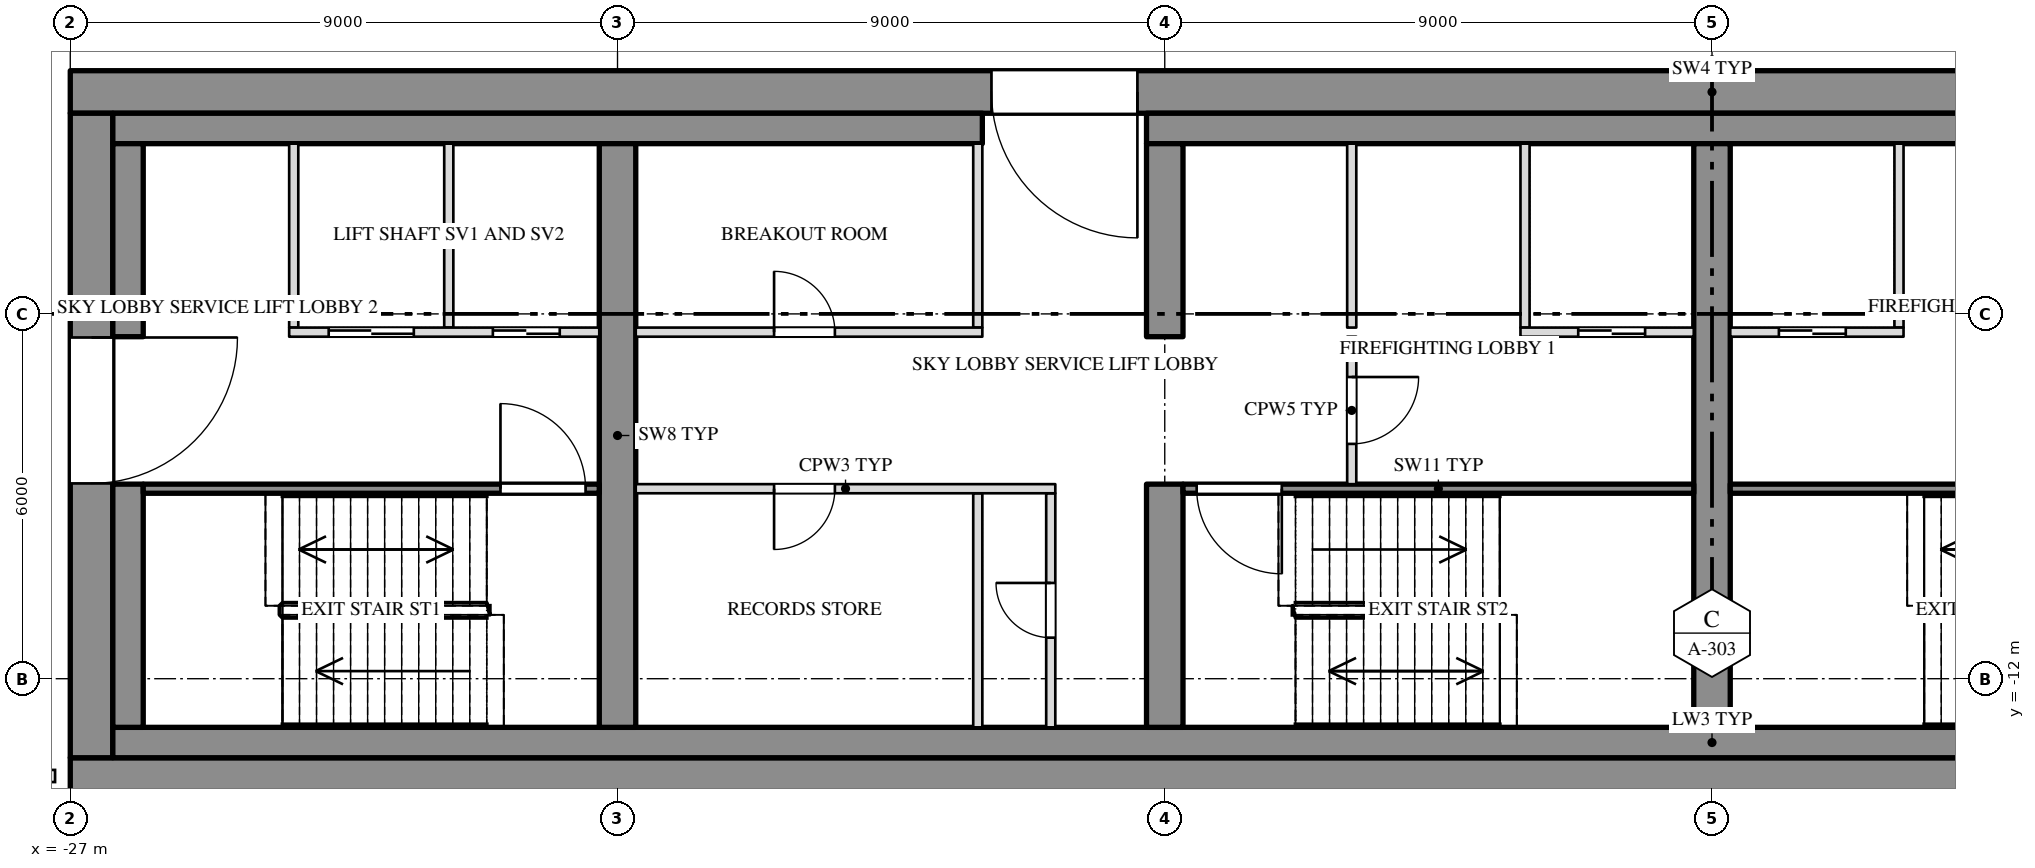
"""IFC4 building model, lengths in metres.
Left out: names, types, materials, properties, quantities, classifications, styles, units other than length and angle.
Written with IfcOpenShell. Run it as: python <this file> out.ifc"""

import sys

from ifc_helpers import new_model, si_unit, direction, frame, frame_2d, origin, place, context, subcontext, project, spatial, rectangle, extrude, element, fill, save


model = new_model("IFC4")
c1 = context("Model", 3, precision=1e-05, world=origin(), true_north=direction((0.0, 1.0)))
c2 = subcontext(c1, "Body", "Model", "MODEL_VIEW")
j1 = project(units=[si_unit("LENGTHUNIT", "METRE"), si_unit("PLANEANGLEUNIT", "RADIAN")], contexts=[c1])
p1 = place(None, origin())
s1 = spatial("IfcSite", under=j1, at=p1, CompositionType="ELEMENT")
p2 = place(p1, origin())
s2 = spatial("IfcBuilding", under=s1, at=p2, CompositionType="ELEMENT")
p3 = place(p2, frame((0.0, 0.0, 264.5)))
s3 = spatial("IfcBuildingStorey", under=s2, at=p3, CompositionType="ELEMENT", Elevation=264.5)
p4 = place(p3, frame((-27.0, -2.35, 0.0), z_axis=(0.0, 0.0, 1.0), x_axis=(1.0, 0.0, 0.0)))
e1 = element("IfcWall", 1, at=p4, inside=s3, PredefinedType="SHEAR", context=c2, shape_type="SweptSolid", body=[
    extrude(rectangle(XDim=54.0, YDim=0.7, at=frame_2d((27.0, 0.0))), origin(), (0.0, 0.0, 1.0), 3.65),
])
p5 = place(p4, frame((15.15, 0.0, 0.0)))
e2 = element("IfcOpeningElement", 2, at=p5, cuts=e1, PredefinedType="OPENING", context=c2, shape_type="SweptSolid", body=[
    extrude(rectangle(XDim=2.4, YDim=2.1, at=frame_2d((1.2, 1.05))), frame((0.0, 0.362, 0.0), z_axis=(0.0, -1.0, 0.0), x_axis=(1.0, 0.0, 0.0)), (0.0, 0.0, 1.0), 0.724),
])
p6 = place(p4, frame((36.45, 0.0, 0.0)))
e3 = element("IfcOpeningElement", 3, at=p6, cuts=e1, PredefinedType="OPENING", context=c2, shape_type="SweptSolid", body=[
    extrude(rectangle(XDim=2.4, YDim=2.1, at=frame_2d((1.2, 1.05))), frame((0.0, 0.362, 0.0), z_axis=(0.0, -1.0, 0.0), x_axis=(1.0, 0.0, 0.0)), (0.0, 0.0, 1.0), 0.724),
])
p7 = place(p3, frame((-27.0, -13.65, 0.0), z_axis=(0.0, 0.0, 1.0), x_axis=(1.0, 0.0, 0.0)))
e4 = element("IfcWall", 4, at=p7, inside=s3, PredefinedType="SHEAR", context=c2, shape_type="SweptSolid", body=[
    extrude(rectangle(XDim=54.0, YDim=0.7, at=frame_2d((27.0, 0.0))), origin(), (0.0, 0.0, 1.0), 3.65),
])
p8 = place(p3, frame((-26.65, -13.3, 0.0), z_axis=(0.0, 0.0, 1.0), x_axis=(0.0, 1.0, 0.0)))
e5 = element("IfcWall", 5, at=p8, inside=s3, PredefinedType="SHEAR", context=c2, shape_type="SweptSolid", body=[
    extrude(rectangle(XDim=10.6, YDim=0.7, at=frame_2d((5.3, 0.0))), origin(), (0.0, 0.0, 1.0), 3.65),
])
p9 = place(p8, frame((4.512, 0.0, 0.0)))
e6 = element("IfcOpeningElement", 6, at=p9, cuts=e5, PredefinedType="OPENING", context=c2, shape_type="SweptSolid", body=[
    extrude(rectangle(XDim=2.4, YDim=2.1, at=frame_2d((1.2, 1.05))), frame((0.0, 0.362, 0.0), z_axis=(0.0, -1.0, 0.0), x_axis=(1.0, 0.0, 0.0)), (0.0, 0.0, 1.0), 0.724),
])
p10 = place(p3, frame((-26.3, -2.95, 0.0), z_axis=(0.0, 0.0, 1.0), x_axis=(1.0, 0.0, 0.0)))
e7 = element("IfcWall", 7, at=p10, inside=s3, PredefinedType="SHEAR", context=c2, shape_type="SweptSolid", body=[
    extrude(rectangle(XDim=14.3, YDim=0.5, at=frame_2d((7.15, 0.0))), origin(), (0.0, 0.0, 1.0), 3.65),
])
p11 = place(p3, frame((-9.3, -2.95, 0.0), z_axis=(0.0, 0.0, 1.0), x_axis=(1.0, 0.0, 0.0)))
e8 = element("IfcWall", 8, at=p11, inside=s3, PredefinedType="SHEAR", context=c2, shape_type="SweptSolid", body=[
    extrude(rectangle(XDim=18.6, YDim=0.5, at=frame_2d((9.3, 0.0))), origin(), (0.0, 0.0, 1.0), 3.65),
])
p12 = place(p3, frame((-26.3, -13.05, 0.0), z_axis=(0.0, 0.0, 1.0), x_axis=(1.0, 0.0, 0.0)))
e9 = element("IfcWall", 9, at=p12, inside=s3, PredefinedType="SHEAR", context=c2, shape_type="SweptSolid", body=[
    extrude(rectangle(XDim=52.6, YDim=0.5, at=frame_2d((26.3, 0.0))), origin(), (0.0, 0.0, 1.0), 3.65),
])
p13 = place(p3, frame((-26.05, -12.8, 0.0), z_axis=(0.0, 0.0, 1.0), x_axis=(0.0, 1.0, 0.0)))
e10 = element("IfcWall", 10, at=p13, inside=s3, PredefinedType="SHEAR", context=c2, shape_type="SweptSolid", body=[
    extrude(rectangle(XDim=4.0, YDim=0.5, at=frame_2d((2.0, 0.0))), origin(), (0.0, 0.0, 1.0), 3.65),
])
p14 = place(p3, frame((-26.05, -6.375, 0.0), z_axis=(0.0, 0.0, 1.0), x_axis=(0.0, 1.0, 0.0)))
e11 = element("IfcWall", 11, at=p14, inside=s3, PredefinedType="SHEAR", context=c2, shape_type="SweptSolid", body=[
    extrude(rectangle(XDim=3.175, YDim=0.5, at=frame_2d((1.587, 0.0))), origin(), (0.0, 0.0, 1.0), 3.65),
])
p15 = place(p3, frame((-18.0, -12.8, 0.0), z_axis=(0.0, 0.0, 1.0), x_axis=(0.0, 1.0, 0.0)))
e12 = element("IfcWall", 12, at=p15, inside=s3, PredefinedType="SHEAR", context=c2, shape_type="SweptSolid", body=[
    extrude(rectangle(XDim=9.6, YDim=0.6, at=frame_2d((4.8, 0.0))), origin(), (0.0, 0.0, 1.0), 3.65),
])
p16 = place(p3, frame((-9.0, -12.8, 0.0), z_axis=(0.0, 0.0, 1.0), x_axis=(0.0, 1.0, 0.0)))
e13 = element("IfcWall", 13, at=p16, inside=s3, PredefinedType="SHEAR", context=c2, shape_type="SweptSolid", body=[
    extrude(rectangle(XDim=4.0, YDim=0.6, at=frame_2d((2.0, 0.0))), origin(), (0.0, 0.0, 1.0), 3.65),
])
p17 = place(p3, frame((-9.0, -6.375, 0.0), z_axis=(0.0, 0.0, 1.0), x_axis=(0.0, 1.0, 0.0)))
e14 = element("IfcWall", 14, at=p17, inside=s3, PredefinedType="SHEAR", context=c2, shape_type="SweptSolid", body=[
    extrude(rectangle(XDim=3.175, YDim=0.6, at=frame_2d((1.587, 0.0))), origin(), (0.0, 0.0, 1.0), 3.65),
])
p18 = place(p3, frame((0.0, -12.8, 0.0), z_axis=(0.0, 0.0, 1.0), x_axis=(0.0, 1.0, 0.0)))
e15 = element("IfcWall", 15, at=p18, inside=s3, PredefinedType="SHEAR", context=c2, shape_type="SweptSolid", body=[
    extrude(rectangle(XDim=9.6, YDim=0.6, at=frame_2d((4.8, 0.0))), origin(), (0.0, 0.0, 1.0), 3.65),
])
for number, where, z_axis, x_axis in (
    (16, (-20.775, -6.225, 0.0), (0.0, 0.0, 1.0), (0.0, 1.0, 0.0)),
    (17, (-23.325, -6.225, 0.0), (0.0, 0.0, 1.0), (0.0, 1.0, 0.0)),
    (18, (-12.075, -6.225, 0.0), (0.0, 0.0, 1.0), (0.0, 1.0, 0.0)),
    (19, (-3.075, -6.225, 0.0), (0.0, 0.0, 1.0), (0.0, 1.0, 0.0)),
    (20, (-5.925, -6.225, 0.0), (0.0, 0.0, 1.0), (0.0, 1.0, 0.0)),
    (21, (3.075, -6.225, 0.0), (0.0, 0.0, 1.0), (0.0, 1.0, 0.0)),
):
    element("IfcWall", number, at=place(p3, frame(where, z_axis=z_axis, x_axis=x_axis)), inside=s3, PredefinedType="PARTITIONING", context=c2, shape_type="SweptSolid", body=[
        extrude(rectangle(XDim=3.025, YDim=0.15, at=frame_2d((1.513, 0.0))), origin(), (0.0, 0.0, 1.0), 3.65),
    ])
p19 = place(p3, frame((-10.875, -12.8, 0.0), z_axis=(0.0, 0.0, 1.0), x_axis=(0.0, 1.0, 0.0)))
e22 = element("IfcWall", 22, at=p19, inside=s3, PredefinedType="PARTITIONING", context=c2, shape_type="SweptSolid", body=[
    extrude(rectangle(XDim=3.85, YDim=0.15, at=frame_2d((1.925, 0.0))), origin(), (0.0, 0.0, 1.0), 3.65),
])
p20 = place(p19, frame((1.475, 0.0, 0.0)))
e23 = element("IfcOpeningElement", 23, at=p20, cuts=e22, PredefinedType="OPENING", context=c2, shape_type="SweptSolid", body=[
    extrude(rectangle(XDim=0.9, YDim=2.1, at=frame_2d((0.45, 1.05))), frame((0.0, 0.087, 0.0), z_axis=(0.0, -1.0, 0.0), x_axis=(1.0, 0.0, 0.0)), (0.0, 0.0, 1.0), 0.174),
])
p21 = place(p3, frame((-12.075, -12.8, 0.0), z_axis=(0.0, 0.0, 1.0), x_axis=(0.0, 1.0, 0.0)))
e24 = element("IfcWall", 24, at=p21, inside=s3, PredefinedType="PARTITIONING", context=c2, shape_type="SweptSolid", body=[
    extrude(rectangle(XDim=3.85, YDim=0.15, at=frame_2d((1.925, 0.0))), origin(), (0.0, 0.0, 1.0), 3.65),
])
p22 = place(p3, frame((-5.925, -8.8, 0.0), z_axis=(0.0, 0.0, 1.0), x_axis=(0.0, 1.0, 0.0)))
e25 = element("IfcWall", 25, at=p22, inside=s3, PredefinedType="PARTITIONING", context=c2, shape_type="SweptSolid", body=[
    extrude(rectangle(XDim=2.425, YDim=0.15, at=frame_2d((1.212, 0.0))), origin(), (0.0, 0.0, 1.0), 3.65),
])
p23 = place(p22, frame((0.662, 0.0, 0.0)))
e26 = element("IfcOpeningElement", 26, at=p23, cuts=e25, PredefinedType="OPENING", context=c2, shape_type="SweptSolid", body=[
    extrude(rectangle(XDim=1.1, YDim=2.1, at=frame_2d((0.55, 1.05))), frame((0.0, 0.087, 0.0), z_axis=(0.0, -1.0, 0.0), x_axis=(1.0, 0.0, 0.0)), (0.0, 0.0, 1.0), 0.174),
])
p24 = place(p3, frame((-23.4, -6.3, 0.0), z_axis=(0.0, 0.0, 1.0), x_axis=(1.0, 0.0, 0.0)))
e27 = element("IfcWall", 27, at=p24, inside=s3, PredefinedType="PARTITIONING", context=c2, shape_type="SweptSolid", body=[
    extrude(rectangle(XDim=5.1, YDim=0.15, at=frame_2d((2.55, 0.0))), origin(), (0.0, 0.0, 1.0), 3.65),
])
p25 = place(p24, frame((0.65, 0.0, 0.0)))
e28 = element("IfcOpeningElement", 28, at=p25, cuts=e27, PredefinedType="OPENING", context=c2, shape_type="SweptSolid", body=[
    extrude(rectangle(XDim=1.4, YDim=2.1, at=frame_2d((0.7, 1.05))), frame((0.0, 0.087, 0.0), z_axis=(0.0, -1.0, 0.0), x_axis=(1.0, 0.0, 0.0)), (0.0, 0.0, 1.0), 0.174),
])
p26 = place(p24, frame((3.35, 0.0, 0.0)))
e29 = element("IfcOpeningElement", 29, at=p26, cuts=e27, PredefinedType="OPENING", context=c2, shape_type="SweptSolid", body=[
    extrude(rectangle(XDim=1.1, YDim=2.1, at=frame_2d((0.55, 1.05))), frame((0.0, 0.087, 0.0), z_axis=(0.0, -1.0, 0.0), x_axis=(1.0, 0.0, 0.0)), (0.0, 0.0, 1.0), 0.174),
])
p27 = place(p3, frame((-17.7, -6.3, 0.0), z_axis=(0.0, 0.0, 1.0), x_axis=(1.0, 0.0, 0.0)))
e30 = element("IfcWall", 30, at=p27, inside=s3, PredefinedType="PARTITIONING", context=c2, shape_type="SweptSolid", body=[
    extrude(rectangle(XDim=5.7, YDim=0.15, at=frame_2d((2.85, 0.0))), origin(), (0.0, 0.0, 1.0), 3.65),
])
p28 = place(p27, frame((2.275, 0.0, 0.0)))
e31 = element("IfcOpeningElement", 31, at=p28, cuts=e30, PredefinedType="OPENING", context=c2, shape_type="SweptSolid", body=[
    extrude(rectangle(XDim=1.0, YDim=2.1, at=frame_2d((0.5, 1.05))), frame((0.0, 0.087, 0.0), z_axis=(0.0, -1.0, 0.0), x_axis=(1.0, 0.0, 0.0)), (0.0, 0.0, 1.0), 0.174),
])
p29 = place(p3, frame((-3.15, -6.3, 0.0), z_axis=(0.0, 0.0, 1.0), x_axis=(1.0, 0.0, 0.0)))
e32 = element("IfcWall", 32, at=p29, inside=s3, PredefinedType="PARTITIONING", context=c2, shape_type="SweptSolid", body=[
    extrude(rectangle(XDim=2.85, YDim=0.15, at=frame_2d((1.425, 0.0))), origin(), (0.0, 0.0, 1.0), 3.65),
])
p30 = place(p29, frame((0.95, 0.0, 0.0)))
e33 = element("IfcOpeningElement", 33, at=p30, cuts=e32, PredefinedType="OPENING", context=c2, shape_type="SweptSolid", body=[
    extrude(rectangle(XDim=1.1, YDim=2.1, at=frame_2d((0.55, 1.05))), frame((0.0, 0.087, 0.0), z_axis=(0.0, -1.0, 0.0), x_axis=(1.0, 0.0, 0.0)), (0.0, 0.0, 1.0), 0.174),
])
p31 = place(p3, frame((0.3, -6.3, 0.0), z_axis=(0.0, 0.0, 1.0), x_axis=(1.0, 0.0, 0.0)))
e34 = element("IfcWall", 34, at=p31, inside=s3, PredefinedType="PARTITIONING", context=c2, shape_type="SweptSolid", body=[
    extrude(rectangle(XDim=2.85, YDim=0.15, at=frame_2d((1.425, 0.0))), origin(), (0.0, 0.0, 1.0), 3.65),
])
p32 = place(p31, frame((0.8, 0.0, 0.0)))
e35 = element("IfcOpeningElement", 35, at=p32, cuts=e34, PredefinedType="OPENING", context=c2, shape_type="SweptSolid", body=[
    extrude(rectangle(XDim=1.1, YDim=2.1, at=frame_2d((0.55, 1.05))), frame((0.0, 0.087, 0.0), z_axis=(0.0, -1.0, 0.0), x_axis=(1.0, 0.0, 0.0)), (0.0, 0.0, 1.0), 0.174),
])
p33 = place(p3, frame((-25.8, -8.875, 0.0), z_axis=(0.0, 0.0, 1.0), x_axis=(1.0, 0.0, 0.0)))
e36 = element("IfcWall", 36, at=p33, inside=s3, PredefinedType="SHEAR", context=c2, shape_type="SweptSolid", body=[
    extrude(rectangle(XDim=7.5, YDim=0.15, at=frame_2d((3.75, 0.0))), origin(), (0.0, 0.0, 1.0), 3.65),
])
p34 = place(p33, frame((5.875, 0.0, 0.0)))
e37 = element("IfcOpeningElement", 37, at=p34, cuts=e36, PredefinedType="OPENING", context=c2, shape_type="SweptSolid", body=[
    extrude(rectangle(XDim=1.4, YDim=2.1, at=frame_2d((0.7, 1.05))), frame((0.0, 0.087, 0.0), z_axis=(0.0, -1.0, 0.0), x_axis=(1.0, 0.0, 0.0)), (0.0, 0.0, 1.0), 0.174),
])
p35 = place(p3, frame((-17.7, -8.875, 0.0), z_axis=(0.0, 0.0, 1.0), x_axis=(1.0, 0.0, 0.0)))
e38 = element("IfcWall", 38, at=p35, inside=s3, PredefinedType="PARTITIONING", context=c2, shape_type="SweptSolid", body=[
    extrude(rectangle(XDim=6.9, YDim=0.15, at=frame_2d((3.45, 0.0))), origin(), (0.0, 0.0, 1.0), 3.65),
])
p36 = place(p35, frame((2.275, 0.0, 0.0)))
e39 = element("IfcOpeningElement", 39, at=p36, cuts=e38, PredefinedType="OPENING", context=c2, shape_type="SweptSolid", body=[
    extrude(rectangle(XDim=1.0, YDim=2.1, at=frame_2d((0.5, 1.05))), frame((0.0, 0.087, 0.0), z_axis=(0.0, -1.0, 0.0), x_axis=(1.0, 0.0, 0.0)), (0.0, 0.0, 1.0), 0.174),
])
p37 = place(p3, frame((-8.7, -8.875, 0.0), z_axis=(0.0, 0.0, 1.0), x_axis=(1.0, 0.0, 0.0)))
e40 = element("IfcWall", 40, at=p37, inside=s3, PredefinedType="SHEAR", context=c2, shape_type="SweptSolid", body=[
    extrude(rectangle(XDim=8.4, YDim=0.15, at=frame_2d((4.2, 0.0))), origin(), (0.0, 0.0, 1.0), 3.65),
])
p38 = place(p37, frame((0.225, 0.0, 0.0)))
e41 = element("IfcOpeningElement", 41, at=p38, cuts=e40, PredefinedType="OPENING", context=c2, shape_type="SweptSolid", body=[
    extrude(rectangle(XDim=1.4, YDim=2.1, at=frame_2d((0.7, 1.05))), frame((0.0, 0.087, 0.0), z_axis=(0.0, -1.0, 0.0), x_axis=(1.0, 0.0, 0.0)), (0.0, 0.0, 1.0), 0.174),
])
p39 = place(p3, frame((0.3, -8.875, 0.0), z_axis=(0.0, 0.0, 1.0), x_axis=(1.0, 0.0, 0.0)))
e42 = element("IfcWall", 42, at=p39, inside=s3, PredefinedType="SHEAR", context=c2, shape_type="SweptSolid", body=[
    extrude(rectangle(XDim=8.4, YDim=0.15, at=frame_2d((4.2, 0.0))), origin(), (0.0, 0.0, 1.0), 3.65),
])
p40 = place(p39, frame((6.775, 0.0, 0.0)))
e43 = element("IfcOpeningElement", 43, at=p40, cuts=e42, PredefinedType="OPENING", context=c2, shape_type="SweptSolid", body=[
    extrude(rectangle(XDim=1.4, YDim=2.1, at=frame_2d((0.7, 1.05))), frame((0.0, 0.087, 0.0), z_axis=(0.0, -1.0, 0.0), x_axis=(1.0, 0.0, 0.0)), (0.0, 0.0, 1.0), 0.174),
])
p41 = place(p9, origin())
e44 = element("IfcDoor", 44, at=p41, inside=s3, OperationType="DOUBLE_DOOR_SINGLE_SWING", PredefinedType="DOOR", context=c2, shape_type="SweptSolid", body=[
    extrude(rectangle(XDim=2.4, YDim=2.1, at=frame_2d((1.2, 1.05))), frame((0.0, 0.025, 0.0), z_axis=(0.0, -1.0, 0.0), x_axis=(1.0, 0.0, 0.0)), (0.0, 0.0, 1.0), 0.05),
])
fill(e6, e44)
p42 = place(p25, origin())
e45 = element("IfcDoor", 45, at=p42, inside=s3, OperationType="SLIDING_TO_RIGHT", PredefinedType="DOOR", context=c2, shape_type="SweptSolid", body=[
    extrude(rectangle(XDim=1.4, YDim=2.1, at=frame_2d((0.7, 1.05))), frame((0.0, 0.025, 0.0), z_axis=(0.0, -1.0, 0.0), x_axis=(1.0, 0.0, 0.0)), (0.0, 0.0, 1.0), 0.05),
])
fill(e28, e45)
p43 = place(p26, origin())
e46 = element("IfcDoor", 46, at=p43, inside=s3, OperationType="SLIDING_TO_LEFT", PredefinedType="DOOR", context=c2, shape_type="SweptSolid", body=[
    extrude(rectangle(XDim=1.1, YDim=2.1, at=frame_2d((0.55, 1.05))), frame((0.0, 0.025, 0.0), z_axis=(0.0, -1.0, 0.0), x_axis=(1.0, 0.0, 0.0)), (0.0, 0.0, 1.0), 0.05),
])
fill(e29, e46)
p44 = place(p34, origin())
e47 = element("IfcDoor", 47, at=p44, inside=s3, OperationType="DOUBLE_DOOR_SINGLE_SWING", PredefinedType="DOOR", context=c2, shape_type="SweptSolid", body=[
    extrude(rectangle(XDim=1.4, YDim=2.1, at=frame_2d((0.7, 1.05))), frame((0.0, 0.025, 0.0), z_axis=(0.0, -1.0, 0.0), x_axis=(1.0, 0.0, 0.0)), (0.0, 0.0, 1.0), 0.05),
])
fill(e37, e47)
p45 = place(p36, origin())
e48 = element("IfcDoor", 48, at=p45, inside=s3, OperationType="SINGLE_SWING_RIGHT", PredefinedType="DOOR", context=c2, shape_type="SweptSolid", body=[
    extrude(rectangle(XDim=1.0, YDim=2.1, at=frame_2d((0.5, 1.05))), frame((0.0, 0.025, 0.0), z_axis=(0.0, -1.0, 0.0), x_axis=(1.0, 0.0, 0.0)), (0.0, 0.0, 1.0), 0.05),
])
fill(e39, e48)
p46 = place(p28, origin())
e49 = element("IfcDoor", 49, at=p46, inside=s3, OperationType="SINGLE_SWING_LEFT", PredefinedType="DOOR", context=c2, shape_type="SweptSolid", body=[
    extrude(rectangle(XDim=1.0, YDim=2.1, at=frame_2d((0.5, 1.05))), frame((0.0, 0.025, 0.0), z_axis=(0.0, -1.0, 0.0), x_axis=(1.0, 0.0, 0.0)), (0.0, 0.0, 1.0), 0.05),
])
fill(e31, e49)
p47 = place(p20, origin())
e50 = element("IfcDoor", 50, at=p47, inside=s3, OperationType="SINGLE_SWING_RIGHT", PredefinedType="DOOR", context=c2, shape_type="SweptSolid", body=[
    extrude(rectangle(XDim=0.9, YDim=2.1, at=frame_2d((0.45, 1.05))), frame((0.0, 0.025, 0.0), z_axis=(0.0, -1.0, 0.0), x_axis=(1.0, 0.0, 0.0)), (0.0, 0.0, 1.0), 0.05),
])
fill(e23, e50)
p48 = place(p5, origin())
e51 = element("IfcDoor", 51, at=p48, inside=s3, OperationType="DOUBLE_DOOR_SINGLE_SWING", PredefinedType="DOOR", context=c2, shape_type="SweptSolid", body=[
    extrude(rectangle(XDim=2.4, YDim=2.1, at=frame_2d((1.2, 1.05))), frame((0.0, 0.025, 0.0), z_axis=(0.0, -1.0, 0.0), x_axis=(1.0, 0.0, 0.0)), (0.0, 0.0, 1.0), 0.05),
])
fill(e2, e51)
p49 = place(p38, origin())
e52 = element("IfcDoor", 52, at=p49, inside=s3, OperationType="DOUBLE_DOOR_SINGLE_SWING", PredefinedType="DOOR", context=c2, shape_type="SweptSolid", body=[
    extrude(rectangle(XDim=1.4, YDim=2.1, at=frame_2d((0.7, 1.05))), frame((0.0, 0.025, 0.0), z_axis=(0.0, -1.0, 0.0), x_axis=(1.0, 0.0, 0.0)), (0.0, 0.0, 1.0), 0.05),
])
fill(e41, e52)
p50 = place(p23, origin())
e53 = element("IfcDoor", 53, at=p50, inside=s3, OperationType="SINGLE_SWING_LEFT", PredefinedType="DOOR", context=c2, shape_type="SweptSolid", body=[
    extrude(rectangle(XDim=1.1, YDim=2.1, at=frame_2d((0.55, 1.05))), frame((0.0, 0.025, 0.0), z_axis=(0.0, -1.0, 0.0), x_axis=(1.0, 0.0, 0.0)), (0.0, 0.0, 1.0), 0.05),
])
fill(e26, e53)
p51 = place(p30, origin())
e54 = element("IfcDoor", 54, at=p51, inside=s3, OperationType="SLIDING_TO_LEFT", PredefinedType="DOOR", context=c2, shape_type="SweptSolid", body=[
    extrude(rectangle(XDim=1.1, YDim=2.1, at=frame_2d((0.55, 1.05))), frame((0.0, 0.025, 0.0), z_axis=(0.0, -1.0, 0.0), x_axis=(1.0, 0.0, 0.0)), (0.0, 0.0, 1.0), 0.05),
])
fill(e33, e54)
p52 = place(p32, origin())
e55 = element("IfcDoor", 55, at=p52, inside=s3, OperationType="SLIDING_TO_RIGHT", PredefinedType="DOOR", context=c2, shape_type="SweptSolid", body=[
    extrude(rectangle(XDim=1.1, YDim=2.1, at=frame_2d((0.55, 1.05))), frame((0.0, 0.025, 0.0), z_axis=(0.0, -1.0, 0.0), x_axis=(1.0, 0.0, 0.0)), (0.0, 0.0, 1.0), 0.05),
])
fill(e35, e55)
save(model, sys.argv[1])
